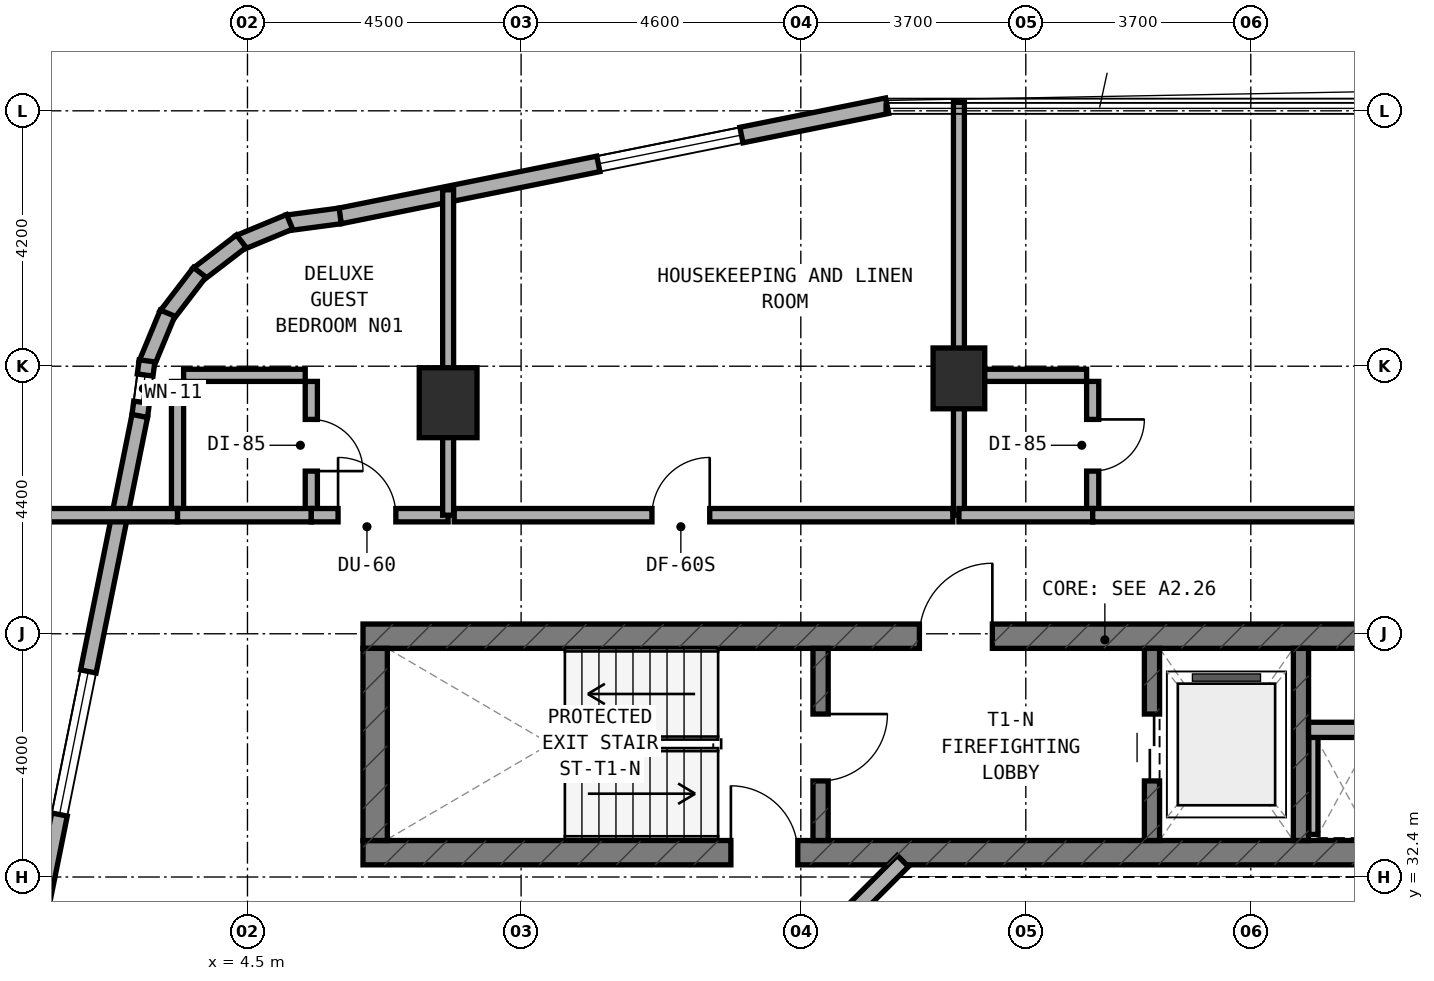
"""IFC4 building model, lengths in metres.
Left out: names, types, materials, properties, quantities, classifications, styles, units other than length and angle.
Written with IfcOpenShell. Run it as: python <this file> out.ifc"""

import sys

from ifc_helpers import new_model, si_unit, direction, frame, frame_2d, origin, origin_2d, place, context, subcontext, project, spatial, rectangle, extrude, element, fill, save


model = new_model("IFC4")
c1 = context("Model", 3, precision=1e-05, world=origin(), true_north=direction((0.0, 1.0)))
c2 = subcontext(c1, "Body", "Model", "MODEL_VIEW")
j1 = project(units=[si_unit("LENGTHUNIT", "METRE"), si_unit("PLANEANGLEUNIT", "RADIAN")], contexts=[c1])
p1 = place(None, origin())
s1 = spatial("IfcSite", under=j1, at=p1, CompositionType="ELEMENT")
p2 = place(p1, origin())
s2 = spatial("IfcBuilding", under=s1, at=p2, CompositionType="ELEMENT")
p3 = place(p2, frame((0.0, 0.0, 116.0)))
s3 = spatial("IfcBuildingStorey", under=s2, at=p3, CompositionType="ELEMENT", Elevation=116.0)
p4 = place(p3, frame((6.4, 32.8, 0.0), z_axis=(0.0, 0.0, 1.0), x_axis=(1.0, 0.0, 0.0)))
e1 = element("IfcWall", 1, at=p4, inside=s3, PredefinedType="SHEAR", context=c2, shape_type="SweptSolid", body=[
    extrude(rectangle(XDim=24.4, YDim=0.4, at=frame_2d((12.2, 0.0))), origin(), (0.0, 0.0, 1.0), 3.5),
])
p5 = place(p4, frame((6.05, 0.0, 0.0)))
e2 = element("IfcOpeningElement", 2, at=p5, cuts=e1, PredefinedType="OPENING", context=c2, shape_type="SweptSolid", body=[
    extrude(rectangle(XDim=1.1, YDim=2.15, at=frame_2d((0.55, 1.075))), frame((0.0, 0.21, 0.0), z_axis=(0.0, -1.0, 0.0), x_axis=(1.0, 0.0, 0.0)), (0.0, 0.0, 1.0), 0.42),
])
p6 = place(p3, frame((6.4, 36.36, 0.0), z_axis=(0.0, 0.0, 1.0), x_axis=(1.0, 0.0, 0.0)))
e3 = element("IfcWall", 3, at=p6, inside=s3, PredefinedType="SHEAR", context=c2, shape_type="SweptSolid", body=[
    extrude(rectangle(XDim=24.4, YDim=0.4, at=frame_2d((12.2, 0.0))), origin(), (0.0, 0.0, 1.0), 3.5),
])
p7 = place(p6, frame((9.15, 0.0, 0.0)))
e4 = element("IfcOpeningElement", 4, at=p7, cuts=e3, PredefinedType="OPENING", context=c2, shape_type="SweptSolid", body=[
    extrude(rectangle(XDim=1.2, YDim=2.15, at=frame_2d((0.6, 1.075))), frame((0.0, 0.21, 0.0), z_axis=(0.0, -1.0, 0.0), x_axis=(1.0, 0.0, 0.0)), (0.0, 0.0, 1.0), 0.42),
])
p8 = place(p6, frame((16.94, 0.0, 0.0)))
e5 = element("IfcOpeningElement", 5, at=p8, cuts=e3, PredefinedType="OPENING", context=c2, shape_type="SweptSolid", body=[
    extrude(rectangle(XDim=0.85, YDim=2.1, at=frame_2d((0.425, 1.05))), frame((0.0, 0.21, 0.0), z_axis=(0.0, -1.0, 0.0), x_axis=(1.0, 0.0, 0.0)), (0.0, 0.0, 1.0), 0.42),
])
p9 = place(p6, frame((18.783, 0.0, 0.0)))
e6 = element("IfcOpeningElement", 6, at=p9, cuts=e3, PredefinedType="OPENING", context=c2, shape_type="SweptSolid", body=[
    extrude(rectangle(XDim=1.1, YDim=2.15, at=frame_2d((0.55, 1.075))), frame((0.0, 0.21, 0.0), z_axis=(0.0, -1.0, 0.0), x_axis=(1.0, 0.0, 0.0)), (0.0, 0.0, 1.0), 0.42),
])
p10 = place(p6, frame((20.65, 0.0, 0.0)))
e7 = element("IfcOpeningElement", 7, at=p10, cuts=e3, PredefinedType="OPENING", context=c2, shape_type="SweptSolid", body=[
    extrude(rectangle(XDim=1.1, YDim=2.15, at=frame_2d((0.55, 1.075))), frame((0.0, 0.21, 0.0), z_axis=(0.0, -1.0, 0.0), x_axis=(1.0, 0.0, 0.0)), (0.0, 0.0, 1.0), 0.42),
])
p11 = place(p6, frame((22.517, 0.0, 0.0)))
e8 = element("IfcOpeningElement", 8, at=p11, cuts=e3, PredefinedType="OPENING", context=c2, shape_type="SweptSolid", body=[
    extrude(rectangle(XDim=1.1, YDim=2.15, at=frame_2d((0.55, 1.075))), frame((0.0, 0.21, 0.0), z_axis=(0.0, -1.0, 0.0), x_axis=(1.0, 0.0, 0.0)), (0.0, 0.0, 1.0), 0.42),
])
p12 = place(p3, frame((6.6, 33.0, 0.0), z_axis=(0.0, 0.0, 1.0), x_axis=(0.0, 1.0, 0.0)))
e9 = element("IfcWall", 9, at=p12, inside=s3, PredefinedType="SHEAR", context=c2, shape_type="SweptSolid", body=[
    extrude(rectangle(XDim=3.16, YDim=0.4, at=frame_2d((1.58, 0.0))), origin(), (0.0, 0.0, 1.0), 3.5),
])
p13 = place(p3, frame((13.925, 33.0, 0.0), z_axis=(0.0, 0.0, 1.0), x_axis=(0.0, 1.0, 0.0)))
e10 = element("IfcWall", 10, at=p13, inside=s3, PredefinedType="STANDARD", context=c2, shape_type="SweptSolid", body=[
    extrude(rectangle(XDim=3.16, YDim=0.25, at=frame_2d((1.58, 0.0))), origin(), (0.0, 0.0, 1.0), 3.18),
])
p14 = place(p13, frame((0.98, 0.0, 0.0)))
e11 = element("IfcOpeningElement", 11, at=p14, cuts=e10, PredefinedType="OPENING", context=c2, shape_type="SweptSolid", body=[
    extrude(rectangle(XDim=1.1, YDim=2.15, at=frame_2d((0.55, 1.075))), frame((0.0, 0.135, 0.0), z_axis=(0.0, -1.0, 0.0), x_axis=(1.0, 0.0, 0.0)), (0.0, 0.0, 1.0), 0.27),
])
p15 = place(p3, frame((19.375, 33.0, 0.0), z_axis=(0.0, 0.0, 1.0), x_axis=(0.0, 1.0, 0.0)))
e12 = element("IfcWall", 12, at=p15, inside=s3, PredefinedType="STANDARD", context=c2, shape_type="SweptSolid", body=[
    extrude(rectangle(XDim=3.16, YDim=0.25, at=frame_2d((1.58, 0.0))), origin(), (0.0, 0.0, 1.0), 3.18),
])
p16 = place(p15, frame((0.98, 0.0, 0.0)))
e13 = element("IfcOpeningElement", 13, at=p16, cuts=e12, PredefinedType="OPENING", context=c2, shape_type="SweptSolid", body=[
    extrude(rectangle(XDim=1.1, YDim=2.15, at=frame_2d((0.55, 1.075))), frame((0.0, 0.135, 0.0), z_axis=(0.0, -1.0, 0.0), x_axis=(1.0, 0.0, 0.0)), (0.0, 0.0, 1.0), 0.27),
])
p17 = place(p3, frame((21.825, 33.0, 0.0), z_axis=(0.0, 0.0, 1.0), x_axis=(0.0, 1.0, 0.0)))
e14 = element("IfcWall", 14, at=p17, inside=s3, PredefinedType="STANDARD", context=c2, shape_type="SweptSolid", body=[
    extrude(rectangle(XDim=3.16, YDim=0.25, at=frame_2d((1.58, 0.0))), origin(), (0.0, 0.0, 1.0), 3.18),
])
p18 = place(p3, frame((16.2, 40.6, 0.0), z_axis=(0.0, 0.0, 1.0), x_axis=(1.0, 0.0, 0.0)))
e15 = element("IfcColumn", 15, at=p18, inside=s3, PredefinedType="COLUMN", context=c2, shape_type="SweptSolid", body=[
    extrude(rectangle(XDim=0.85, YDim=1.0, at=origin_2d()), origin(), (0.0, 0.0, 1.0), 3.5),
])
p19 = place(p3, frame((7.8, 40.2, 0.0), z_axis=(0.0, 0.0, 1.0), x_axis=(1.0, 0.0, 0.0)))
e16 = element("IfcColumn", 16, at=p19, inside=s3, PredefinedType="COLUMN", context=c2, shape_type="SweptSolid", body=[
    extrude(rectangle(XDim=0.95, YDim=1.15, at=origin_2d()), origin(), (0.0, 0.0, 1.0), 3.5),
])
p20 = place(p3, frame((15.02, 45.084, 0.0), z_axis=(0.0, 0.0, 1.0), x_axis=(-0.980315963543, -0.197435082048, 0.0)))
e17 = element("IfcWall", 17, at=p20, inside=s3, PredefinedType="STANDARD", context=c2, shape_type="SweptSolid", body=[
    extrude(rectangle(XDim=9.183, YDim=0.26, at=frame_2d((4.591, 0.0))), origin(), (0.0, 0.0, 1.0), 3.18),
])
p21 = place(p20, frame((2.445, 0.0, 0.8)))
e18 = element("IfcOpeningElement", 18, at=p21, cuts=e17, PredefinedType="OPENING", context=c2, shape_type="SweptSolid", body=[
    extrude(rectangle(XDim=2.4, YDim=1.6, at=frame_2d((1.2, 0.8))), frame((0.0, 0.14, 0.0), z_axis=(0.0, -1.0, 0.0), x_axis=(1.0, 0.0, 0.0)), (0.0, 0.0, 1.0), 0.28),
])
p22 = place(p3, frame((6.025, 43.272, 0.0), z_axis=(0.0, 0.0, 1.0), x_axis=(-0.991388484223, -0.130953706898, 0.0)))
e19 = element("IfcWall", 19, at=p22, inside=s3, PredefinedType="STANDARD", context=c2, shape_type="SweptSolid", body=[
    extrude(rectangle(XDim=0.885, YDim=0.26, at=frame_2d((0.443, 0.0))), origin(), (0.0, 0.0, 1.0), 3.18),
])
p23 = place(p3, frame((5.193, 43.174, 0.0), z_axis=(0.0, 0.0, 1.0), x_axis=(-0.923627776508, -0.383290660547, 0.0)))
e20 = element("IfcWall", 20, at=p23, inside=s3, PredefinedType="STANDARD", context=c2, shape_type="SweptSolid", body=[
    extrude(rectangle(XDim=0.903, YDim=0.26, at=frame_2d((0.452, 0.0))), origin(), (0.0, 0.0, 1.0), 3.18),
])
p24 = place(p3, frame((4.399, 42.856, 0.0), z_axis=(0.0, 0.0, 1.0), x_axis=(-0.793458244748, -0.608624690463, 0.0)))
e21 = element("IfcWall", 21, at=p24, inside=s3, PredefinedType="STANDARD", context=c2, shape_type="SweptSolid", body=[
    extrude(rectangle(XDim=0.902, YDim=0.26, at=frame_2d((0.451, 0.0))), origin(), (0.0, 0.0, 1.0), 3.18),
])
p25 = place(p3, frame((3.714, 42.345, 0.0), z_axis=(0.0, 0.0, 1.0), x_axis=(-0.608494022858, -0.793558456666, 0.0)))
e22 = element("IfcWall", 22, at=p25, inside=s3, PredefinedType="STANDARD", context=c2, shape_type="SweptSolid", body=[
    extrude(rectangle(XDim=0.902, YDim=0.26, at=frame_2d((0.451, 0.0))), origin(), (0.0, 0.0, 1.0), 3.18),
])
p26 = place(p3, frame((3.186, 41.673, 0.0), z_axis=(0.0, 0.0, 1.0), x_axis=(-0.383155708213, -0.923683767999, 0.0)))
e23 = element("IfcWall", 23, at=p26, inside=s3, PredefinedType="STANDARD", context=c2, shape_type="SweptSolid", body=[
    extrude(rectangle(XDim=0.903, YDim=0.26, at=frame_2d((0.451, 0.0))), origin(), (0.0, 0.0, 1.0), 3.18),
])
p27 = place(p3, frame((2.848, 40.888, 0.0), z_axis=(0.0, 0.0, 1.0), x_axis=(-0.130200706103, -0.991487658083, 0.0)))
e24 = element("IfcWall", 24, at=p27, inside=s3, PredefinedType="STANDARD", context=c2, shape_type="SweptSolid", body=[
    extrude(rectangle(XDim=0.921, YDim=0.26, at=frame_2d((0.46, 0.0))), origin(), (0.0, 0.0, 1.0), 3.18),
])
p28 = place(p27, frame((0.235, 0.0, 0.85)))
e25 = element("IfcOpeningElement", 25, at=p28, cuts=e24, PredefinedType="OPENING", context=c2, shape_type="SweptSolid", body=[
    extrude(rectangle(XDim=0.45, YDim=1.5, at=frame_2d((0.225, 0.75))), frame((0.0, 0.14, 0.0), z_axis=(0.0, -1.0, 0.0), x_axis=(1.0, 0.0, 0.0)), (0.0, 0.0, 1.0), 0.28),
])
p29 = place(p3, frame((2.729, 39.982, 0.0), z_axis=(0.0, 0.0, 1.0), x_axis=(-0.197435082048, -0.980315963543, 0.0)))
e26 = element("IfcWall", 26, at=p29, inside=s3, PredefinedType="STANDARD", context=c2, shape_type="SweptSolid", body=[
    extrude(rectangle(XDim=9.183, YDim=0.26, at=frame_2d((4.591, 0.0))), origin(), (0.0, 0.0, 1.0), 3.18),
])
p30 = place(p29, frame((4.286, 0.0, 0.8)))
e27 = element("IfcOpeningElement", 27, at=p30, cuts=e26, PredefinedType="OPENING", context=c2, shape_type="SweptSolid", body=[
    extrude(rectangle(XDim=2.4, YDim=1.6, at=frame_2d((1.2, 0.8))), frame((0.0, 0.14, 0.0), z_axis=(0.0, -1.0, 0.0), x_axis=(1.0, 0.0, 0.0)), (0.0, 0.0, 1.0), 0.28),
])
p31 = place(p3, frame((15.278, 32.662, 0.0), z_axis=(0.0, 0.0, 1.0), x_axis=(-0.707059717605, -0.707153841636, 0.0)))
e28 = element("IfcWall", 28, at=p31, inside=s3, PredefinedType="STANDARD", context=c2, shape_type="SweptSolid", body=[
    extrude(rectangle(XDim=2.594, YDim=0.26, at=frame_2d((1.297, 0.0))), origin(), (0.0, 0.0, 1.0), 3.18),
])
p32 = place(p3, frame((22.03, 33.1, 0.0), z_axis=(0.0, 0.0, 1.0), x_axis=(0.0, 1.0, 0.0)))
e29 = element("IfcWall", 29, at=p32, inside=s3, PredefinedType="PARTITIONING", context=c2, shape_type="SweptSolid", body=[
    extrude(rectangle(XDim=1.62, YDim=0.15, at=frame_2d((0.81, 0.0))), origin(), (0.0, 0.0, 1.0), 3.18),
])
p33 = place(p3, frame((21.95, 34.82, 0.0), z_axis=(0.0, 0.0, 1.0), x_axis=(1.0, 0.0, 0.0)))
e30 = element("IfcWall", 30, at=p33, inside=s3, PredefinedType="SOLIDWALL", context=c2, shape_type="SweptSolid", body=[
    extrude(rectangle(XDim=1.15, YDim=0.25, at=frame_2d((0.575, 0.0))), origin(), (0.0, 0.0, 1.0), 3.18),
])
p34 = place(p3, frame((5.55, 38.45, 0.0), z_axis=(0.0, 0.0, 1.0), x_axis=(0.0, 1.0, 0.0)))
e31 = element("IfcWall", 31, at=p34, inside=s3, PredefinedType="PLUMBINGWALL", context=c2, shape_type="SweptSolid", body=[
    extrude(rectangle(XDim=2.1, YDim=0.2, at=frame_2d((1.05, 0.0))), origin(), (0.0, 0.0, 1.0), 3.18),
])
p35 = place(p34, frame((0.625, 0.0, 0.0)))
e32 = element("IfcOpeningElement", 32, at=p35, cuts=e31, PredefinedType="OPENING", context=c2, shape_type="SweptSolid", body=[
    extrude(rectangle(XDim=0.85, YDim=2.1, at=frame_2d((0.425, 1.05))), frame((0.0, 0.11, 0.0), z_axis=(0.0, -1.0, 0.0), x_axis=(1.0, 0.0, 0.0)), (0.0, 0.0, 1.0), 0.22),
])
p36 = place(p3, frame((3.45, 40.65, 0.0), z_axis=(0.0, 0.0, 1.0), x_axis=(1.0, 0.0, 0.0)))
e33 = element("IfcWall", 33, at=p36, inside=s3, PredefinedType="PLUMBINGWALL", context=c2, shape_type="SweptSolid", body=[
    extrude(rectangle(XDim=2.0, YDim=0.2, at=frame_2d((1.0, 0.0))), origin(), (0.0, 0.0, 1.0), 3.18),
])
p37 = place(p3, frame((3.35, 38.45, 0.0), z_axis=(0.0, 0.0, 1.0), x_axis=(0.0, 1.0, 0.0)))
e34 = element("IfcWall", 34, at=p37, inside=s3, PredefinedType="PLUMBINGWALL", context=c2, shape_type="SweptSolid", body=[
    extrude(rectangle(XDim=2.1, YDim=0.2, at=frame_2d((1.05, 0.0))), origin(), (0.0, 0.0, 1.0), 3.18),
])
p38 = place(p3, frame((0.96, 38.35, 0.0), z_axis=(0.0, 0.0, 1.0), x_axis=(1.0, 0.0, 0.0)))
e35 = element("IfcWall", 35, at=p38, inside=s3, PredefinedType="SOLIDWALL", context=c2, shape_type="SweptSolid", body=[
    extrude(rectangle(XDim=2.39, YDim=0.22, at=frame_2d((1.195, 0.0))), origin(), (0.0, 0.0, 1.0), 3.18),
])
p39 = place(p3, frame((3.35, 38.35, 0.0), z_axis=(0.0, 0.0, 1.0), x_axis=(1.0, 0.0, 0.0)))
e36 = element("IfcWall", 36, at=p39, inside=s3, PredefinedType="SOLIDWALL", context=c2, shape_type="SweptSolid", body=[
    extrude(rectangle(XDim=2.2, YDim=0.22, at=frame_2d((1.1, 0.0))), origin(), (0.0, 0.0, 1.0), 3.18),
])
p40 = place(p3, frame((5.55, 38.35, 0.0), z_axis=(0.0, 0.0, 1.0), x_axis=(1.0, 0.0, 0.0)))
e37 = element("IfcWall", 37, at=p40, inside=s3, PredefinedType="SOLIDWALL", context=c2, shape_type="SweptSolid", body=[
    extrude(rectangle(XDim=2.25, YDim=0.22, at=frame_2d((1.125, 0.0))), origin(), (0.0, 0.0, 1.0), 2.655),
])
p41 = place(p40, frame((0.44, 0.0, 0.0)))
e38 = element("IfcOpeningElement", 38, at=p41, cuts=e37, PredefinedType="OPENING", context=c2, shape_type="SweptSolid", body=[
    extrude(rectangle(XDim=0.95, YDim=2.1, at=frame_2d((0.475, 1.05))), frame((0.0, 0.12, 0.0), z_axis=(0.0, -1.0, 0.0), x_axis=(1.0, 0.0, 0.0)), (0.0, 0.0, 1.0), 0.24),
])
p42 = place(p3, frame((7.8, 38.35, 0.0), z_axis=(0.0, 0.0, 1.0), x_axis=(0.0, 1.0, 0.0)))
e39 = element("IfcWall", 39, at=p42, inside=s3, PredefinedType="SOLIDWALL", context=c2, shape_type="SweptSolid", body=[
    extrude(rectangle(XDim=5.351, YDim=0.18, at=frame_2d((2.675, 0.0))), origin(), (0.0, 0.0, 1.0), 2.655),
])
p43 = place(p3, frame((7.9, 38.35, 0.0), z_axis=(0.0, 0.0, 1.0), x_axis=(1.0, 0.0, 0.0)))
e40 = element("IfcWall", 40, at=p43, inside=s3, PredefinedType="SOLIDWALL", context=c2, shape_type="SweptSolid", body=[
    extrude(rectangle(XDim=8.2, YDim=0.22, at=frame_2d((4.1, 0.0))), origin(), (0.0, 0.0, 1.0), 3.18),
])
p44 = place(p43, frame((3.252, 0.0, 0.0)))
e41 = element("IfcOpeningElement", 41, at=p44, cuts=e40, PredefinedType="OPENING", context=c2, shape_type="SweptSolid", body=[
    extrude(rectangle(XDim=0.95, YDim=2.1, at=frame_2d((0.475, 1.05))), frame((0.0, 0.12, 0.0), z_axis=(0.0, -1.0, 0.0), x_axis=(1.0, 0.0, 0.0)), (0.0, 0.0, 1.0), 0.24),
])
p45 = place(p3, frame((16.2, 38.35, 0.0), z_axis=(0.0, 0.0, 1.0), x_axis=(0.0, 1.0, 0.0)))
e42 = element("IfcWall", 42, at=p45, inside=s3, PredefinedType="SOLIDWALL", context=c2, shape_type="SweptSolid", body=[
    extrude(rectangle(XDim=6.79, YDim=0.18, at=frame_2d((3.395, 0.0))), origin(), (0.0, 0.0, 1.0), 2.655),
])
p46 = place(p3, frame((18.4, 38.45, 0.0), z_axis=(0.0, 0.0, 1.0), x_axis=(0.0, 1.0, 0.0)))
e43 = element("IfcWall", 43, at=p46, inside=s3, PredefinedType="PLUMBINGWALL", context=c2, shape_type="SweptSolid", body=[
    extrude(rectangle(XDim=2.1, YDim=0.2, at=frame_2d((1.05, 0.0))), origin(), (0.0, 0.0, 1.0), 2.795),
])
p47 = place(p46, frame((0.625, 0.0, 0.0)))
e44 = element("IfcOpeningElement", 44, at=p47, cuts=e43, PredefinedType="OPENING", context=c2, shape_type="SweptSolid", body=[
    extrude(rectangle(XDim=0.85, YDim=2.1, at=frame_2d((0.425, 1.05))), frame((0.0, 0.11, 0.0), z_axis=(0.0, -1.0, 0.0), x_axis=(1.0, 0.0, 0.0)), (0.0, 0.0, 1.0), 0.22),
])
p48 = place(p3, frame((16.3, 40.65, 0.0), z_axis=(0.0, 0.0, 1.0), x_axis=(1.0, 0.0, 0.0)))
e45 = element("IfcWall", 45, at=p48, inside=s3, PredefinedType="PLUMBINGWALL", context=c2, shape_type="SweptSolid", body=[
    extrude(rectangle(XDim=2.0, YDim=0.2, at=frame_2d((1.0, 0.0))), origin(), (0.0, 0.0, 1.0), 2.795),
])
p49 = place(p3, frame((16.2, 38.35, 0.0), z_axis=(0.0, 0.0, 1.0), x_axis=(1.0, 0.0, 0.0)))
e46 = element("IfcWall", 46, at=p49, inside=s3, PredefinedType="SOLIDWALL", context=c2, shape_type="SweptSolid", body=[
    extrude(rectangle(XDim=2.2, YDim=0.22, at=frame_2d((1.1, 0.0))), origin(), (0.0, 0.0, 1.0), 2.655),
])
p50 = place(p3, frame((18.4, 38.35, 0.0), z_axis=(0.0, 0.0, 1.0), x_axis=(1.0, 0.0, 0.0)))
e47 = element("IfcWall", 47, at=p50, inside=s3, PredefinedType="SOLIDWALL", context=c2, shape_type="SweptSolid", body=[
    extrude(rectangle(XDim=11.8, YDim=0.22, at=frame_2d((5.9, 0.0))), origin(), (0.0, 0.0, 1.0), 2.655),
])
p51 = place(p50, frame((5.425, 0.0, 0.0)))
e48 = element("IfcOpeningElement", 48, at=p51, cuts=e47, PredefinedType="OPENING", context=c2, shape_type="SweptSolid", body=[
    extrude(rectangle(XDim=0.95, YDim=2.1, at=frame_2d((0.475, 1.05))), frame((0.0, 0.12, 0.0), z_axis=(0.0, -1.0, 0.0), x_axis=(1.0, 0.0, 0.0)), (0.0, 0.0, 1.0), 0.24),
])
p52 = place(p21, origin())
e49 = element("IfcWindow", 49, at=p52, inside=s3, PartitioningType="SINGLE_PANEL", PredefinedType="WINDOW", context=c2, shape_type="SweptSolid", body=[
    extrude(rectangle(XDim=2.4, YDim=1.6, at=frame_2d((1.2, 0.8))), frame((0.0, 0.03, 0.0), z_axis=(0.0, -1.0, 0.0), x_axis=(1.0, 0.0, 0.0)), (0.0, 0.0, 1.0), 0.06),
])
fill(e18, e49)
p53 = place(p30, origin())
e50 = element("IfcWindow", 50, at=p53, inside=s3, PartitioningType="SINGLE_PANEL", PredefinedType="WINDOW", context=c2, shape_type="SweptSolid", body=[
    extrude(rectangle(XDim=2.4, YDim=1.6, at=frame_2d((1.2, 0.8))), frame((0.0, 0.03, 0.0), z_axis=(0.0, -1.0, 0.0), x_axis=(1.0, 0.0, 0.0)), (0.0, 0.0, 1.0), 0.06),
])
fill(e27, e50)
p54 = place(p28, origin())
e51 = element("IfcWindow", 51, at=p54, inside=s3, PartitioningType="SINGLE_PANEL", PredefinedType="WINDOW", context=c2, shape_type="SweptSolid", body=[
    extrude(rectangle(XDim=0.45, YDim=1.5, at=frame_2d((0.225, 0.75))), frame((0.0, 0.03, 0.0), z_axis=(0.0, -1.0, 0.0), x_axis=(1.0, 0.0, 0.0)), (0.0, 0.0, 1.0), 0.06),
])
fill(e25, e51)
p55 = place(p14, frame((1.1, 0.0, 0.0), z_axis=(0.0, 0.0, 1.0), x_axis=(-1.0, 0.0, 0.0)))
e52 = element("IfcDoor", 52, at=p55, inside=s3, OperationType="SINGLE_SWING_LEFT", PredefinedType="DOOR", context=c2, shape_type="SweptSolid", body=[
    extrude(rectangle(XDim=1.1, YDim=2.15, at=frame_2d((0.55, 1.075))), frame((0.0, 0.025, 0.0), z_axis=(0.0, -1.0, 0.0), x_axis=(1.0, 0.0, 0.0)), (0.0, 0.0, 1.0), 0.05),
])
fill(e11, e52)
p56 = place(p7, origin())
e53 = element("IfcDoor", 53, at=p56, inside=s3, OperationType="SINGLE_SWING_RIGHT", PredefinedType="DOOR", context=c2, shape_type="SweptSolid", body=[
    extrude(rectangle(XDim=1.2, YDim=2.15, at=frame_2d((0.6, 1.075))), frame((0.0, 0.025, 0.0), z_axis=(0.0, -1.0, 0.0), x_axis=(1.0, 0.0, 0.0)), (0.0, 0.0, 1.0), 0.05),
])
fill(e4, e53)
p57 = place(p16, origin())
e54 = element("IfcDoor", 54, at=p57, inside=s3, OperationType="DOUBLE_DOOR_SLIDING", PredefinedType="DOOR", context=c2, shape_type="SweptSolid", body=[
    extrude(rectangle(XDim=1.1, YDim=2.15, at=frame_2d((0.55, 1.075))), frame((0.0, 0.025, 0.0), z_axis=(0.0, -1.0, 0.0), x_axis=(1.0, 0.0, 0.0)), (0.0, 0.0, 1.0), 0.05),
])
fill(e13, e54)
p58 = place(p5, origin())
e55 = element("IfcDoor", 55, at=p58, inside=s3, OperationType="SINGLE_SWING_LEFT", PredefinedType="DOOR", context=c2, shape_type="SweptSolid", body=[
    extrude(rectangle(XDim=1.1, YDim=2.15, at=frame_2d((0.55, 1.075))), frame((0.0, 0.025, 0.0), z_axis=(0.0, -1.0, 0.0), x_axis=(1.0, 0.0, 0.0)), (0.0, 0.0, 1.0), 0.05),
])
fill(e2, e55)
p59 = place(p35, frame((0.85, 0.0, 0.0), z_axis=(0.0, 0.0, 1.0), x_axis=(-1.0, 0.0, 0.0)))
e56 = element("IfcDoor", 56, at=p59, inside=s3, OperationType="SINGLE_SWING_RIGHT", PredefinedType="DOOR", context=c2, shape_type="SweptSolid", body=[
    extrude(rectangle(XDim=0.85, YDim=2.1, at=frame_2d((0.425, 1.05))), frame((0.0, 0.025, 0.0), z_axis=(0.0, -1.0, 0.0), x_axis=(1.0, 0.0, 0.0)), (0.0, 0.0, 1.0), 0.05),
])
fill(e32, e56)
p60 = place(p41, origin())
e57 = element("IfcDoor", 57, at=p60, inside=s3, OperationType="SINGLE_SWING_LEFT", PredefinedType="DOOR", context=c2, shape_type="SweptSolid", body=[
    extrude(rectangle(XDim=0.95, YDim=2.1, at=frame_2d((0.475, 1.05))), frame((0.0, 0.025, 0.0), z_axis=(0.0, -1.0, 0.0), x_axis=(1.0, 0.0, 0.0)), (0.0, 0.0, 1.0), 0.05),
])
fill(e38, e57)
p61 = place(p44, origin())
e58 = element("IfcDoor", 58, at=p61, inside=s3, OperationType="SINGLE_SWING_RIGHT", PredefinedType="DOOR", context=c2, shape_type="SweptSolid", body=[
    extrude(rectangle(XDim=0.95, YDim=2.1, at=frame_2d((0.475, 1.05))), frame((0.0, 0.025, 0.0), z_axis=(0.0, -1.0, 0.0), x_axis=(1.0, 0.0, 0.0)), (0.0, 0.0, 1.0), 0.05),
])
fill(e41, e58)
p62 = place(p47, frame((0.85, 0.0, 0.0), z_axis=(0.0, 0.0, 1.0), x_axis=(-1.0, 0.0, 0.0)))
e59 = element("IfcDoor", 59, at=p62, inside=s3, OperationType="SINGLE_SWING_LEFT", PredefinedType="DOOR", context=c2, shape_type="SweptSolid", body=[
    extrude(rectangle(XDim=0.85, YDim=2.1, at=frame_2d((0.425, 1.05))), frame((0.0, 0.025, 0.0), z_axis=(0.0, -1.0, 0.0), x_axis=(1.0, 0.0, 0.0)), (0.0, 0.0, 1.0), 0.05),
])
fill(e44, e59)
save(model, sys.argv[1])
